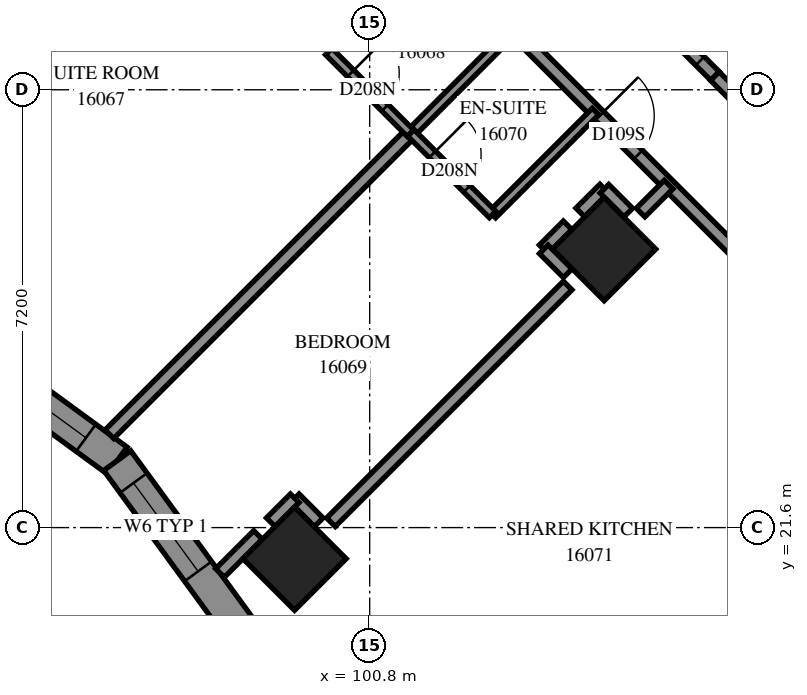
"""IFC4 building model, lengths in metres.
Left out: names, types, materials, properties, quantities, classifications, styles, units other than length and angle.
Written with IfcOpenShell. Run it as: python <this file> out.ifc"""

import sys

from ifc_helpers import new_model, si_unit, direction, frame, frame_2d, origin, origin_2d, place, context, subcontext, project, spatial, polyline, rectangle, outline, extrude, element, fill, save


model = new_model("IFC4")
c1 = context("Model", 3, precision=1e-05, world=origin(), true_north=direction((0.0, 1.0)))
c2 = subcontext(c1, "Body", "Model", "MODEL_VIEW")
j1 = project(units=[si_unit("LENGTHUNIT", "METRE"), si_unit("PLANEANGLEUNIT", "RADIAN")], contexts=[c1])
p1 = place(None, origin())
s1 = spatial("IfcSite", under=j1, at=p1, CompositionType="ELEMENT")
p2 = place(p1, origin())
s2 = spatial("IfcBuilding", under=s1, at=p2, CompositionType="ELEMENT")
p3 = place(p2, frame((0.0, 0.0, 61.0)))
s3 = spatial("IfcBuildingStorey", under=s2, at=p3, CompositionType="ELEMENT", Elevation=61.0)
for number, where, z_axis, x_axis in (
    (1, (104.656, 26.18, 0.0), (0.0, 0.0, 1.0), (0.707, -0.707, 0.0)),
    (2, (99.565, 21.088, 0.0), (0.0, 0.0, 1.0), (0.707, -0.707, 0.0)),
):
    element("IfcColumn", number, at=place(p3, frame(where, z_axis=z_axis, x_axis=x_axis)), inside=s3, PredefinedType="COLUMN", context=c2, shape_type="SweptSolid", body=[
        extrude(rectangle(XDim=1.2, YDim=1.2, at=origin_2d()), origin(), (0.0, 0.0, 1.0), 3.1),
    ])
p4 = place(p3, frame((93.487, 25.009, 0.0), z_axis=(0.0, 0.0, 1.0), x_axis=(0.8076021815, -0.589727663, 0.0)))
e3 = element("IfcWall", 3, at=p4, inside=s3, PredefinedType="SOLIDWALL", context=c2, shape_type="SweptSolid", body=[
    extrude(outline(polyline([(-0.043, -0.275), (3.871, -0.275), (3.957, 0.275), (0.043, 0.275), (-0.043, -0.275)])), origin(), (0.0, 0.0, 1.0), 3.1),
])
p5 = place(p4, frame((0.477, 0.0, 0.5)))
e4 = element("IfcOpeningElement", 4, at=p5, cuts=e3, PredefinedType="OPENING", context=c2, shape_type="SweptSolid", body=[
    extrude(rectangle(XDim=2.8, YDim=2.45, at=frame_2d((1.4, 1.225))), frame((0.0, 0.285, 0.0), z_axis=(0.0, -1.0, 0.0), x_axis=(1.0, 0.0, 0.0)), (0.0, 0.0, 1.0), 0.57),
])
p6 = place(p3, frame((96.648, 22.701, 0.0), z_axis=(0.0, 0.0, 1.0), x_axis=(0.5897321582, -0.807598899, 0.0)))
e5 = element("IfcWall", 5, at=p6, inside=s3, PredefinedType="SOLIDWALL", context=c2, shape_type="SweptSolid", body=[
    extrude(outline(polyline([(0.043, -0.275), (3.957, -0.275), (3.871, 0.275), (-0.043, 0.275), (0.043, -0.275)])), origin(), (0.0, 0.0, 1.0), 3.1),
])
p7 = place(p6, frame((0.455, 0.0, 0.7)))
e6 = element("IfcOpeningElement", 6, at=p7, cuts=e5, PredefinedType="OPENING", context=c2, shape_type="SweptSolid", body=[
    extrude(rectangle(XDim=1.8, YDim=2.2, at=frame_2d((0.9, 1.1))), frame((0.0, 0.285, 0.0), z_axis=(0.0, -1.0, 0.0), x_axis=(1.0, 0.0, 0.0)), (0.0, 0.0, 1.0), 0.57),
])
p8 = place(p3, frame((101.825, 31.125, 0.0), z_axis=(0.0, 0.0, 1.0), x_axis=(0.7071067812, -0.7071067812, 0.0)))
e7 = element("IfcWall", 7, at=p8, inside=s3, PredefinedType="PARTITIONING", context=c2, shape_type="SweptSolid", body=[
    extrude(rectangle(XDim=12.7, YDim=0.2, at=frame_2d((6.35, 0.0))), origin(), (0.0, 0.0, 1.0), 3.1),
])
p9 = place(p8, frame((3.895, 0.0, 0.0)))
e8 = element("IfcOpeningElement", 8, at=p9, cuts=e7, PredefinedType="OPENING", context=c2, shape_type="SweptSolid", body=[
    extrude(rectangle(XDim=0.9, YDim=2.1, at=frame_2d((0.45, 1.05))), frame((0.0, 0.11, 0.0), z_axis=(0.0, -1.0, 0.0), x_axis=(1.0, 0.0, 0.0)), (0.0, 0.0, 1.0), 0.22),
])
p10 = place(p8, frame((9.056, 0.0, 0.0)))
e9 = element("IfcOpeningElement", 9, at=p10, cuts=e7, PredefinedType="OPENING", context=c2, shape_type="SweptSolid", body=[
    extrude(rectangle(XDim=1.0, YDim=2.1, at=frame_2d((0.5, 1.05))), frame((0.0, 0.11, 0.0), z_axis=(0.0, -1.0, 0.0), x_axis=(1.0, 0.0, 0.0)), (0.0, 0.0, 1.0), 0.22),
])
p11 = place(p3, frame((96.519, 23.136, 0.0), z_axis=(0.0, 0.0, 1.0), x_axis=(0.7071067812, 0.7071067812, 0.0)))
e10 = element("IfcWall", 10, at=p11, inside=s3, PredefinedType="PARTITIONING", context=c2, shape_type="SweptSolid", body=[
    extrude(rectangle(XDim=7.005, YDim=0.2, at=frame_2d((3.503, 0.0))), origin(), (0.0, 0.0, 1.0), 3.1),
])
p12 = place(p3, frame((91.457, 28.256, 0.0), z_axis=(0.0, 0.0, 1.0), x_axis=(0.7071067812, 0.7071067812, 0.0)))
e11 = element("IfcWall", 11, at=p12, inside=s3, PredefinedType="PARTITIONING", context=c2, shape_type="SweptSolid", body=[
    extrude(rectangle(XDim=6.964, YDim=0.2, at=frame_2d((3.482, 0.0))), origin(), (0.0, 0.0, 1.0), 3.1),
])
p13 = place(p3, frame((100.163, 21.689, 0.0), z_axis=(0.0, 0.0, 1.0), x_axis=(0.7071067812, 0.7071067812, 0.0)))
e12 = element("IfcWall", 12, at=p13, inside=s3, PredefinedType="PARTITIONING", context=c2, shape_type="SweptSolid", body=[
    extrude(rectangle(XDim=5.504, YDim=0.2, at=frame_2d((2.752, 0.0))), origin(), (0.0, 0.0, 1.0), 3.1),
])
p14 = place(p3, frame((105.257, 16.597, 0.0), z_axis=(0.0, 0.0, 1.0), x_axis=(0.7072884866, 0.706925029, 0.0)))
e13 = element("IfcWall", 13, at=p14, inside=s3, PredefinedType="PARTITIONING", context=c2, shape_type="SweptSolid", body=[
    extrude(rectangle(XDim=5.503, YDim=0.2, at=frame_2d((2.751, 0.0))), origin(), (0.0, 0.0, 1.0), 2.6),
])
p15 = place(p3, frame((104.445, 31.059, 0.0), z_axis=(0.0, 0.0, 1.0), x_axis=(0.7074545101, -0.7067588812, 0.0)))
e14 = element("IfcWall", 14, at=p15, inside=s3, PredefinedType="PARTITIONING", context=c2, shape_type="SweptSolid", body=[
    extrude(rectangle(XDim=2.875, YDim=0.2, at=frame_2d((1.438, 0.0))), origin(), (0.0, 0.0, 1.0), 3.1),
])
p16 = place(p15, frame((1.626, 0.0, 0.0)))
e15 = element("IfcOpeningElement", 15, at=p16, cuts=e14, PredefinedType="OPENING", context=c2, shape_type="SweptSolid", body=[
    extrude(rectangle(XDim=0.9, YDim=2.1, at=frame_2d((0.45, 1.05))), frame((0.0, 0.11, 0.0), z_axis=(0.0, -1.0, 0.0), x_axis=(1.0, 0.0, 0.0)), (0.0, 0.0, 1.0), 0.22),
])
p17 = place(p3, frame((100.129, 29.433, 0.0), z_axis=(0.0, 0.0, 1.0), x_axis=(0.7071067812, 0.7071067812, 0.0)))
e16 = element("IfcWall", 16, at=p17, inside=s3, PredefinedType="PARTITIONING", context=c2, shape_type="SweptSolid", body=[
    extrude(rectangle(XDim=2.401, YDim=0.15, at=frame_2d((1.201, 0.0))), origin(), (0.0, 0.0, 1.0), 3.1),
])
p18 = place(p3, frame((101.477, 28.085, 0.0), z_axis=(0.0, 0.0, 1.0), x_axis=(0.706689978, 0.7075233388, 0.0)))
e17 = element("IfcWall", 17, at=p18, inside=s3, PredefinedType="PARTITIONING", context=c2, shape_type="SweptSolid", body=[
    extrude(rectangle(XDim=2.4, YDim=0.15, at=frame_2d((1.2, 0.0))), origin(), (0.0, 0.0, 1.0), 3.1),
])
p19 = place(p3, frame((102.817, 26.747, 0.0), z_axis=(0.0, 0.0, 1.0), x_axis=(0.7071067812, 0.7071067812, 0.0)))
e18 = element("IfcWall", 18, at=p19, inside=s3, PredefinedType="PARTITIONING", context=c2, shape_type="SweptSolid", body=[
    extrude(rectangle(XDim=2.398, YDim=0.15, at=frame_2d((1.199, 0.0))), origin(), (0.0, 0.0, 1.0), 3.1),
])
p20 = place(p3, frame((100.127, 29.429, 0.0), z_axis=(0.0, 0.0, 1.0), x_axis=(0.7071067812, -0.7071067812, 0.0)))
e19 = element("IfcWall", 19, at=p20, inside=s3, PredefinedType="PARTITIONING", context=c2, shape_type="SweptSolid", body=[
    extrude(rectangle(XDim=1.901, YDim=0.15, at=frame_2d((0.95, 0.0))), origin(), (0.0, 0.0, 1.0), 3.1),
])
p21 = place(p20, frame((0.508, 0.0, 0.0)))
e20 = element("IfcOpeningElement", 20, at=p21, cuts=e19, PredefinedType="OPENING", context=c2, shape_type="SweptSolid", body=[
    extrude(rectangle(XDim=0.8, YDim=2.1, at=frame_2d((0.4, 1.05))), frame((0.0, 0.085, 0.0), z_axis=(0.0, -1.0, 0.0), x_axis=(1.0, 0.0, 0.0)), (0.0, 0.0, 1.0), 0.17),
])
p22 = place(p3, frame((101.477, 28.091, 0.0), z_axis=(0.0, 0.0, 1.0), x_axis=(0.7076330979, -0.7065800724, 0.0)))
e21 = element("IfcWall", 21, at=p22, inside=s3, PredefinedType="PARTITIONING", context=c2, shape_type="SweptSolid", body=[
    extrude(rectangle(XDim=1.899, YDim=0.15, at=frame_2d((0.95, 0.0))), origin(), (0.0, 0.0, 1.0), 3.1),
])
p23 = place(p22, frame((0.501, 0.0, 0.0)))
e22 = element("IfcOpeningElement", 22, at=p23, cuts=e21, PredefinedType="OPENING", context=c2, shape_type="SweptSolid", body=[
    extrude(rectangle(XDim=0.8, YDim=2.1, at=frame_2d((0.4, 1.05))), frame((0.0, 0.085, 0.0), z_axis=(0.0, -1.0, 0.0), x_axis=(1.0, 0.0, 0.0)), (0.0, 0.0, 1.0), 0.17),
])
p24 = place(p3, frame((98.338, 20.853, 0.0), z_axis=(0.0, 0.0, 1.0), x_axis=(0.7071067812, 0.7071067812, 0.0)))
e23 = element("IfcWall", 23, at=p24, inside=s3, PredefinedType="PARTITIONING", context=c2, shape_type="SweptSolid", body=[
    extrude(rectangle(XDim=0.884, YDim=0.2, at=frame_2d((0.442, 0.0))), origin(), (0.0, 0.0, 1.0), 3.1),
])
p25 = place(p3, frame((106.476, 29.024, 0.0), z_axis=(0.0, 0.0, 1.0), x_axis=(0.7057270646, -0.7084838109, 0.0)))
e24 = element("IfcWall", 24, at=p25, inside=s3, PredefinedType="PARTITIONING", context=c2, shape_type="SweptSolid", body=[
    extrude(rectangle(XDim=0.726, YDim=0.2, at=frame_2d((0.363, 0.0))), origin(), (0.0, 0.0, 1.0), 3.1),
])
p26 = place(p3, frame((105.255, 26.781, 0.0), z_axis=(0.0, 0.0, 1.0), x_axis=(0.7071067812, 0.7071067812, 0.0)))
e25 = element("IfcWall", 25, at=p26, inside=s3, PredefinedType="PARTITIONING", context=c2, shape_type="SweptSolid", body=[
    extrude(rectangle(XDim=0.65, YDim=0.2, at=frame_2d((0.325, 0.0))), origin(), (0.0, 0.0, 1.0), 3.1),
])
for number, where, z_axis, x_axis in (
    (26, (99.568, 22.082, 0.0), (0.0, 0.0, 1.0), (0.707, -0.707, 0.0)),
    (27, (99.173, 21.689, 0.0), (0.0, 0.0, 1.0), (0.707, 0.707, 0.0)),
    (28, (103.661, 26.177, 0.0), (0.0, 0.0, 1.0), (0.707, 0.707, 0.0)),
    (29, (103.662, 26.177, 0.0), (0.0, 0.0, 1.0), (0.707, -0.707, 0.0)),
):
    element("IfcWall", number, at=place(p3, frame(where, z_axis=z_axis, x_axis=x_axis)), inside=s3, PredefinedType="PARTITIONING", context=c2, shape_type="SweptSolid", body=[
        extrude(rectangle(XDim=0.557, YDim=0.2, at=frame_2d((0.279, 0.0))), origin(), (0.0, 0.0, 1.0), 3.1),
    ])
p27 = place(p3, frame((104.263, 26.784, 0.0), z_axis=(0.0, 0.0, 1.0), x_axis=(0.7089037401, 0.705305244, 0.0)))
e30 = element("IfcWall", 30, at=p27, inside=s3, PredefinedType="PARTITIONING", context=c2, shape_type="SweptSolid", body=[
    extrude(rectangle(XDim=0.556, YDim=0.2, at=frame_2d((0.278, 0.0))), origin(), (0.0, 0.0, 1.0), 3.1),
])
p28 = place(p3, frame((104.66, 27.172, 0.0), z_axis=(0.0, 0.0, 1.0), x_axis=(0.7071067812, -0.7071067812, 0.0)))
e31 = element("IfcWall", 31, at=p28, inside=s3, PredefinedType="PARTITIONING", context=c2, shape_type="SweptSolid", body=[
    extrude(rectangle(XDim=0.554, YDim=0.2, at=frame_2d((0.277, 0.0))), origin(), (0.0, 0.0, 1.0), 3.1),
])
p29 = place(p5, origin())
e32 = element("IfcWindow", 32, at=p29, inside=s3, PartitioningType="SINGLE_PANEL", PredefinedType="WINDOW", context=c2, shape_type="SweptSolid", body=[
    extrude(rectangle(XDim=2.8, YDim=2.45, at=frame_2d((1.4, 1.225))), frame((0.0, 0.155, 0.0), z_axis=(0.0, -1.0, 0.0), x_axis=(1.0, 0.0, 0.0)), (0.0, 0.0, 1.0), 0.06),
])
fill(e4, e32)
p30 = place(p16, origin())
e33 = element("IfcDoor", 33, at=p30, inside=s3, OperationType="SINGLE_SWING_RIGHT", PredefinedType="DOOR", context=c2, shape_type="SweptSolid", body=[
    extrude(rectangle(XDim=0.9, YDim=2.1, at=frame_2d((0.45, 1.05))), frame((0.0, 0.025, 0.0), z_axis=(0.0, -1.0, 0.0), x_axis=(1.0, 0.0, 0.0)), (0.0, 0.0, 1.0), 0.05),
])
fill(e15, e33)
p31 = place(p21, origin())
e34 = element("IfcDoor", 34, at=p31, inside=s3, OperationType="SINGLE_SWING_RIGHT", PredefinedType="DOOR", context=c2, shape_type="SweptSolid", body=[
    extrude(rectangle(XDim=0.8, YDim=2.1, at=frame_2d((0.4, 1.05))), frame((0.0, 0.025, 0.0), z_axis=(0.0, -1.0, 0.0), x_axis=(1.0, 0.0, 0.0)), (0.0, 0.0, 1.0), 0.05),
])
fill(e20, e34)
p32 = place(p9, origin())
e35 = element("IfcDoor", 35, at=p32, inside=s3, OperationType="SINGLE_SWING_LEFT", PredefinedType="DOOR", context=c2, shape_type="SweptSolid", body=[
    extrude(rectangle(XDim=0.9, YDim=2.1, at=frame_2d((0.45, 1.05))), frame((0.0, 0.025, 0.0), z_axis=(0.0, -1.0, 0.0), x_axis=(1.0, 0.0, 0.0)), (0.0, 0.0, 1.0), 0.05),
])
fill(e8, e35)
p33 = place(p23, origin())
e36 = element("IfcDoor", 36, at=p33, inside=s3, OperationType="SINGLE_SWING_RIGHT", PredefinedType="DOOR", context=c2, shape_type="SweptSolid", body=[
    extrude(rectangle(XDim=0.8, YDim=2.1, at=frame_2d((0.4, 1.05))), frame((0.0, 0.025, 0.0), z_axis=(0.0, -1.0, 0.0), x_axis=(1.0, 0.0, 0.0)), (0.0, 0.0, 1.0), 0.05),
])
fill(e22, e36)
p34 = place(p7, origin())
e37 = element("IfcWindow", 37, at=p34, inside=s3, PartitioningType="SINGLE_PANEL", PredefinedType="WINDOW", context=c2, shape_type="SweptSolid", body=[
    extrude(rectangle(XDim=1.8, YDim=2.2, at=frame_2d((0.9, 1.1))), frame((0.0, 0.155, 0.0), z_axis=(0.0, -1.0, 0.0), x_axis=(1.0, 0.0, 0.0)), (0.0, 0.0, 1.0), 0.06),
])
fill(e6, e37)
save(model, sys.argv[1])
